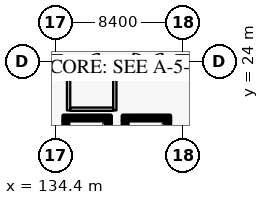
"""IFC4 building model, lengths in metres.
Left out: names, types, materials, properties, quantities, classifications, styles, units other than length and angle.
Written with IfcOpenShell. Run it as: python <this file> out.ifc"""

import sys

from ifc_helpers import new_model, si_unit, direction, frame, frame_2d, origin, origin_2d, place, context, subcontext, project, spatial, rectangle, extrude, element, fill, save


model = new_model("IFC4")
c1 = context("Model", 3, precision=1e-05, world=origin(), true_north=direction((0.0, 1.0)))
c2 = subcontext(c1, "Body", "Model", "MODEL_VIEW")
j1 = project(units=[si_unit("LENGTHUNIT", "METRE"), si_unit("PLANEANGLEUNIT", "RADIAN")], contexts=[c1])
p1 = place(None, origin())
s1 = spatial("IfcSite", under=j1, at=p1, CompositionType="ELEMENT")
p2 = place(p1, origin())
s2 = spatial("IfcBuilding", under=s1, at=p2, CompositionType="ELEMENT")
p3 = place(p2, frame((0.0, 0.0, 25.2)))
s3 = spatial("IfcBuildingStorey", under=s2, at=p3, CompositionType="ELEMENT", Elevation=25.2)
for number, where, z_axis, x_axis in (
    (1, (134.4, 24.0, 0.0), (0.0, 0.0, 1.0), (1.0, 0.0, 0.0)),
    (2, (142.8, 24.0, 0.0), (0.0, 0.0, 1.0), (1.0, 0.0, 0.0)),
):
    element("IfcColumn", number, at=place(p3, frame(where, z_axis=z_axis, x_axis=x_axis)), inside=s3, PredefinedType="COLUMN", context=c2, shape_type="SweptSolid", body=[
        extrude(rectangle(XDim=0.7, YDim=0.7, at=origin_2d()), origin(), (0.0, 0.0, 1.0), 3.6),
    ])
p4 = place(p3, frame((137.9, 17.555, 0.0), z_axis=(0.0, 0.0, 1.0), x_axis=(0.0, 1.0, 0.0)))
e3 = element("IfcWall", 3, at=p4, inside=s3, PredefinedType="SHEAR", context=c2, shape_type="SweptSolid", body=[
    extrude(rectangle(XDim=2.59, YDim=0.3, at=frame_2d((1.295, 0.0))), origin(), (0.0, 0.0, 1.0), 3.335),
])
p5 = place(p3, frame((138.05, 20.3, 0.0), z_axis=(0.0, 0.0, 1.0), x_axis=(-1.0, 0.0, 0.0)))
e4 = element("IfcWall", 4, at=p5, inside=s3, PredefinedType="SHEAR", context=c2, shape_type="SweptSolid", body=[
    extrude(rectangle(XDim=3.1, YDim=0.3, at=frame_2d((1.55, 0.0))), origin(), (0.0, 0.0, 1.0), 3.335),
])
for number, where, z_axis, x_axis in (
    (5, (135.1, 20.145, 0.0), (0.0, 0.0, 1.0), (0.0, -1.0, 0.0)),
    (6, (141.8, 17.555, 0.0), (0.0, 0.0, 1.0), (0.0, 1.0, 0.0)),
):
    element("IfcWall", number, at=place(p3, frame(where, z_axis=z_axis, x_axis=x_axis)), inside=s3, PredefinedType="SHEAR", context=c2, shape_type="SweptSolid", body=[
        extrude(rectangle(XDim=2.59, YDim=0.3, at=frame_2d((1.295, 0.0))), origin(), (0.0, 0.0, 1.0), 3.335),
    ])
p6 = place(p3, frame((141.95, 20.3, 0.0), z_axis=(0.0, 0.0, 1.0), x_axis=(-1.0, 0.0, 0.0)))
e7 = element("IfcWall", 7, at=p6, inside=s3, PredefinedType="SHEAR", context=c2, shape_type="SweptSolid", body=[
    extrude(rectangle(XDim=3.1, YDim=0.3, at=frame_2d((1.55, 0.0))), origin(), (0.0, 0.0, 1.0), 3.335),
])
p7 = place(p3, frame((139.0, 20.145, 0.0), z_axis=(0.0, 0.0, 1.0), x_axis=(0.0, -1.0, 0.0)))
e8 = element("IfcWall", 8, at=p7, inside=s3, PredefinedType="SHEAR", context=c2, shape_type="SweptSolid", body=[
    extrude(rectangle(XDim=2.59, YDim=0.3, at=frame_2d((1.295, 0.0))), origin(), (0.0, 0.0, 1.0), 3.335),
])
p8 = place(p3, frame((138.96, 23.6, 0.0), z_axis=(0.0, 0.0, 1.0), x_axis=(1.0, 0.0, 0.0)))
e9 = element("IfcWall", 9, at=p8, inside=s3, PredefinedType="PARTITIONING", context=c2, shape_type="SweptSolid", body=[
    extrude(rectangle(XDim=3.08, YDim=0.14, at=frame_2d((1.54, 0.0))), origin(), (0.0, 0.0, 1.0), 3.335),
])
p9 = place(p8, frame((0.59, 0.0, 0.0)))
e10 = element("IfcOpeningElement", 10, at=p9, cuts=e9, PredefinedType="OPENING", context=c2, shape_type="SweptSolid", body=[
    extrude(rectangle(XDim=1.9, YDim=2.4, at=frame_2d((0.95, 1.2))), frame((0.0, 0.08, 0.0), z_axis=(0.0, -1.0, 0.0), x_axis=(1.0, 0.0, 0.0)), (0.0, 0.0, 1.0), 0.16),
])
p10 = place(p3, frame((135.36, 23.6, 0.0), z_axis=(0.0, 0.0, 1.0), x_axis=(1.0, 0.0, 0.0)))
e11 = element("IfcWall", 11, at=p10, inside=s3, PredefinedType="PARTITIONING", context=c2, shape_type="SweptSolid", body=[
    extrude(rectangle(XDim=2.88, YDim=0.22, at=frame_2d((1.44, 0.0))), origin(), (0.0, 0.0, 1.0), 3.335),
])
p11 = place(p10, frame((0.97, 0.0, 0.0)))
e12 = element("IfcOpeningElement", 12, at=p11, cuts=e11, PredefinedType="OPENING", context=c2, shape_type="SweptSolid", body=[
    extrude(rectangle(XDim=0.94, YDim=2.15, at=frame_2d((0.47, 1.075))), frame((0.0, 0.12, 0.0), z_axis=(0.0, -1.0, 0.0), x_axis=(1.0, 0.0, 0.0)), (0.0, 0.0, 1.0), 0.24),
])
for number, where, z_axis, x_axis in (
    (13, (135.28, 20.8, 0.0), (0.0, 0.0, 1.0), (0.0, 1.0, 0.0)),
    (14, (138.32, 20.8, 0.0), (0.0, 0.0, 1.0), (0.0, 1.0, 0.0)),
):
    element("IfcWall", number, at=place(p3, frame(where, z_axis=z_axis, x_axis=x_axis)), inside=s3, PredefinedType="PARTITIONING", context=c2, shape_type="SweptSolid", body=[
        extrude(rectangle(XDim=2.748, YDim=0.22, at=frame_2d((1.374, 0.0))), origin(), (0.0, 0.0, 1.0), 3.335),
    ])
p12 = place(p3, frame((135.39, 20.88, 0.0), z_axis=(0.0, 0.0, 1.0), x_axis=(1.0, 0.0, 0.0)))
e15 = element("IfcWall", 15, at=p12, inside=s3, PredefinedType="PARTITIONING", context=c2, shape_type="SweptSolid", body=[
    extrude(rectangle(XDim=2.82, YDim=0.22, at=frame_2d((1.41, 0.0))), origin(), (0.0, 0.0, 1.0), 3.335),
])
p13 = place(p9, origin())
e16 = element("IfcDoor", 16, at=p13, inside=s3, OperationType="DOUBLE_DOOR_SINGLE_SWING", PredefinedType="DOOR", context=c2, shape_type="SweptSolid", body=[
    extrude(rectangle(XDim=1.9, YDim=2.4, at=frame_2d((0.95, 1.2))), frame((0.0, 0.025, 0.0), z_axis=(0.0, -1.0, 0.0), x_axis=(1.0, 0.0, 0.0)), (0.0, 0.0, 1.0), 0.05),
])
fill(e10, e16)
p14 = place(p11, origin())
e17 = element("IfcDoor", 17, at=p14, inside=s3, OperationType="SINGLE_SWING_RIGHT", PredefinedType="DOOR", context=c2, shape_type="SweptSolid", body=[
    extrude(rectangle(XDim=0.94, YDim=2.15, at=frame_2d((0.47, 1.075))), frame((0.0, 0.025, 0.0), z_axis=(0.0, -1.0, 0.0), x_axis=(1.0, 0.0, 0.0)), (0.0, 0.0, 1.0), 0.05),
])
fill(e12, e17)
save(model, sys.argv[1])
